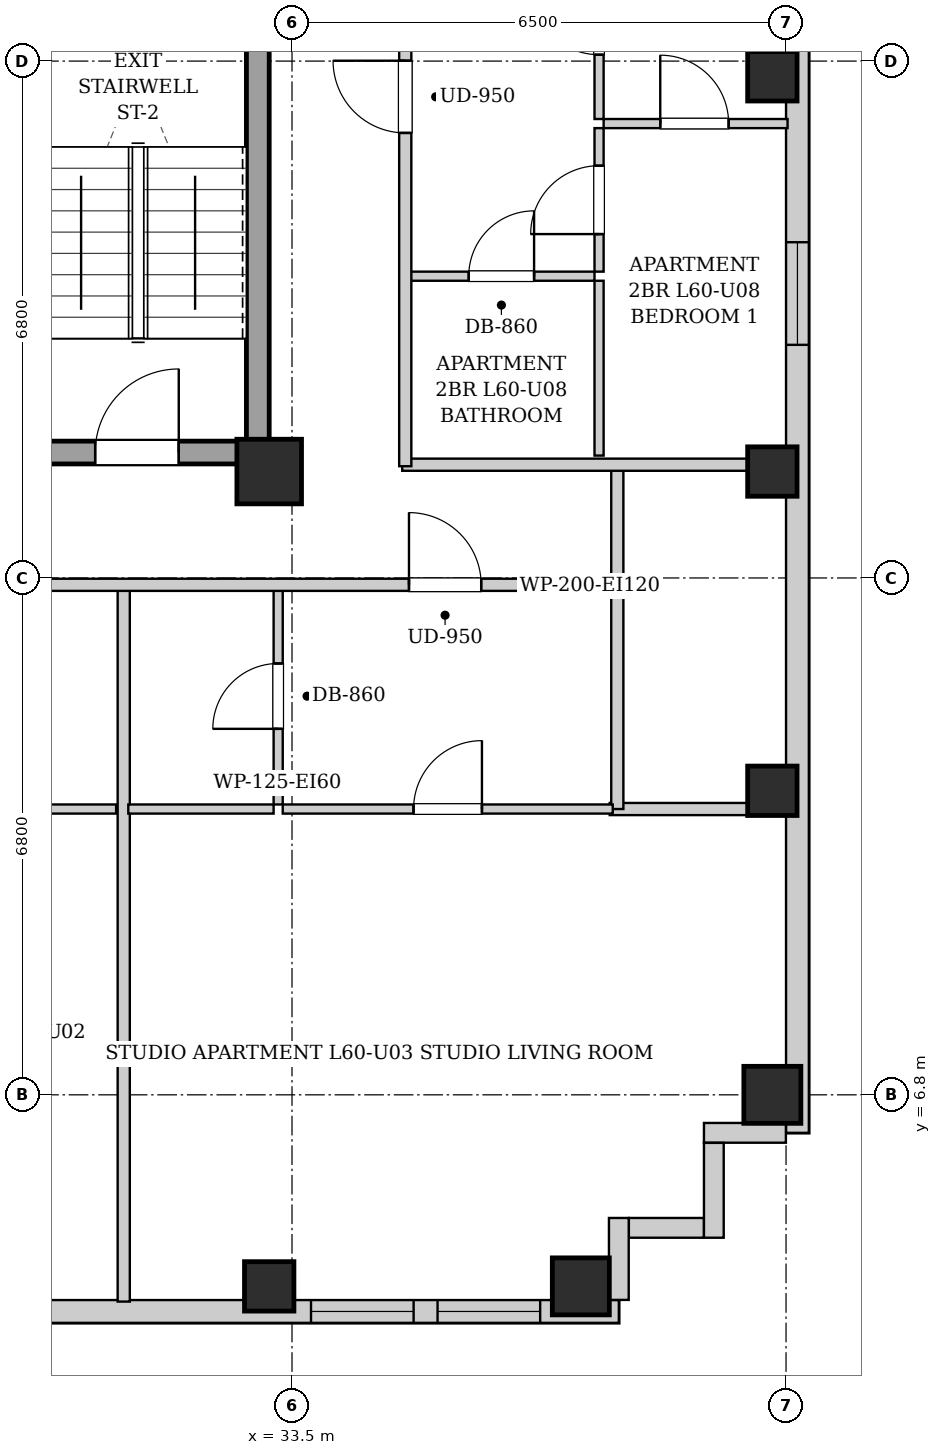
"""IFC4 building model, lengths in metres.
Left out: names, types, materials, properties, quantities, classifications, styles, units other than length and angle.
Written with IfcOpenShell. Run it as: python <this file> out.ifc"""

import sys

from ifc_helpers import new_model, si_unit, direction, frame, frame_2d, origin, origin_2d, place, context, subcontext, project, spatial, rectangle, extrude, element, fill, save


model = new_model("IFC4")
c1 = context("Model", 3, precision=1e-05, world=origin(), true_north=direction((0.0, 1.0)))
c2 = subcontext(c1, "Body", "Model", "MODEL_VIEW")
j1 = project(units=[si_unit("LENGTHUNIT", "METRE"), si_unit("PLANEANGLEUNIT", "RADIAN")], contexts=[c1])
p1 = place(None, origin())
s1 = spatial("IfcSite", under=j1, at=p1, CompositionType="ELEMENT")
p2 = place(p1, origin())
s2 = spatial("IfcBuilding", under=s1, at=p2, CompositionType="ELEMENT")
p3 = place(p2, frame((0.0, 0.0, 207.4)))
s3 = spatial("IfcBuildingStorey", under=s2, at=p3, CompositionType="ELEMENT", Elevation=207.4)
p4 = place(p3, frame((33.2, 4.28, 0.0), z_axis=(0.0, 0.0, 1.0), x_axis=(1.0, 0.0, 0.0)))
e1 = element("IfcColumn", 1, at=p4, inside=s3, PredefinedType="COLUMN", context=c2, shape_type="SweptSolid", body=[
    extrude(rectangle(XDim=0.65, YDim=0.65, at=origin_2d()), origin(), (0.0, 0.0, 1.0), 3.3),
])
for number, where, z_axis, x_axis in (
    (2, (37.3, 4.28, 0.0), (0.0, 0.0, 1.0), (1.0, 0.0, 0.0)),
    (3, (39.82, 6.8, 0.0), (0.0, 0.0, 1.0), (1.0, 0.0, 0.0)),
):
    element("IfcColumn", number, at=place(p3, frame(where, z_axis=z_axis, x_axis=x_axis)), inside=s3, PredefinedType="COLUMN", context=c2, shape_type="SweptSolid", body=[
        extrude(rectangle(XDim=0.75, YDim=0.75, at=origin_2d()), origin(), (0.0, 0.0, 1.0), 3.3),
    ])
for number, where, z_axis, x_axis in (
    (4, (39.82, 10.8, 0.0), (0.0, 0.0, 1.0), (1.0, 0.0, 0.0)),
    (5, (39.82, 15.0, 0.0), (0.0, 0.0, 1.0), (1.0, 0.0, 0.0)),
    (6, (39.82, 20.2, 0.0), (0.0, 0.0, 1.0), (1.0, 0.0, 0.0)),
):
    element("IfcColumn", number, at=place(p3, frame(where, z_axis=z_axis, x_axis=x_axis)), inside=s3, PredefinedType="COLUMN", context=c2, shape_type="SweptSolid", body=[
        extrude(rectangle(XDim=0.65, YDim=0.65, at=origin_2d()), origin(), (0.0, 0.0, 1.0), 3.3),
    ])
p5 = place(p3, frame((33.2, 15.0, 0.0), z_axis=(0.0, 0.0, 1.0), x_axis=(1.0, 0.0, 0.0)))
e7 = element("IfcColumn", 7, at=p5, inside=s3, PredefinedType="COLUMN", context=c2, shape_type="SweptSolid", body=[
    extrude(rectangle(XDim=0.85, YDim=0.85, at=origin_2d()), origin(), (0.0, 0.0, 1.0), 3.3),
])
p6 = place(p3, frame((40.15, 37.7, 0.0), z_axis=(0.0, 0.0, 1.0), x_axis=(0.0, -1.0, 0.0)))
e8 = element("IfcWall", 8, at=p6, inside=s3, PredefinedType="SOLIDWALL", context=c2, shape_type="SweptSolid", body=[
    extrude(rectangle(XDim=31.4, YDim=0.3, at=frame_2d((15.7, 0.0))), origin(), (0.0, 0.0, 1.0), 3.04),
])
p7 = place(p6, frame((1.504, 0.0, 0.55)))
e9 = element("IfcOpeningElement", 9, at=p7, cuts=e8, PredefinedType="OPENING", context=c2, shape_type="SweptSolid", body=[
    extrude(rectangle(XDim=1.35, YDim=1.2, at=frame_2d((0.675, 0.6))), frame((0.0, 0.16, 0.0), z_axis=(0.0, -1.0, 0.0), x_axis=(1.0, 0.0, 0.0)), (0.0, 0.0, 1.0), 0.32),
])
p8 = place(p6, frame((19.683, 0.0, 0.55)))
e10 = element("IfcOpeningElement", 10, at=p8, cuts=e8, PredefinedType="OPENING", context=c2, shape_type="SweptSolid", body=[
    extrude(rectangle(XDim=1.35, YDim=1.2, at=frame_2d((0.675, 0.6))), frame((0.0, 0.16, 0.0), z_axis=(0.0, -1.0, 0.0), x_axis=(1.0, 0.0, 0.0)), (0.0, 0.0, 1.0), 0.32),
])
p9 = place(p6, frame((10.367, 0.0, 0.55)))
e11 = element("IfcOpeningElement", 11, at=p9, cuts=e8, PredefinedType="OPENING", context=c2, shape_type="SweptSolid", body=[
    extrude(rectangle(XDim=1.35, YDim=1.2, at=frame_2d((0.675, 0.6))), frame((0.0, 0.16, 0.0), z_axis=(0.0, -1.0, 0.0), x_axis=(1.0, 0.0, 0.0)), (0.0, 0.0, 1.0), 0.32),
])
p10 = place(p3, frame((37.8, 3.95, 0.0), z_axis=(0.0, 0.0, 1.0), x_axis=(-1.0, 0.0, 0.0)))
e12 = element("IfcWall", 12, at=p10, inside=s3, PredefinedType="SOLIDWALL", context=c2, shape_type="SweptSolid", body=[
    extrude(rectangle(XDim=18.15, YDim=0.3, at=frame_2d((9.075, 0.0))), origin(), (0.0, 0.0, 1.0), 3.04),
])
p11 = place(p10, frame((15.6, 0.0, 0.55)))
e13 = element("IfcOpeningElement", 13, at=p11, cuts=e12, PredefinedType="OPENING", context=c2, shape_type="SweptSolid", body=[
    extrude(rectangle(XDim=1.35, YDim=1.2, at=frame_2d((0.675, 0.6))), frame((0.0, 0.16, 0.0), z_axis=(0.0, -1.0, 0.0), x_axis=(1.0, 0.0, 0.0)), (0.0, 0.0, 1.0), 0.32),
])
p12 = place(p10, frame((8.1, 0.0, 0.55)))
e14 = element("IfcOpeningElement", 14, at=p12, cuts=e12, PredefinedType="OPENING", context=c2, shape_type="SweptSolid", body=[
    extrude(rectangle(XDim=1.35, YDim=1.2, at=frame_2d((0.675, 0.6))), frame((0.0, 0.16, 0.0), z_axis=(0.0, -1.0, 0.0), x_axis=(1.0, 0.0, 0.0)), (0.0, 0.0, 1.0), 0.32),
])
p13 = place(p10, frame((2.7, 0.0, 0.55)))
e15 = element("IfcOpeningElement", 15, at=p13, cuts=e12, PredefinedType="OPENING", context=c2, shape_type="SweptSolid", body=[
    extrude(rectangle(XDim=1.35, YDim=1.2, at=frame_2d((0.675, 0.6))), frame((0.0, 0.16, 0.0), z_axis=(0.0, -1.0, 0.0), x_axis=(1.0, 0.0, 0.0)), (0.0, 0.0, 1.0), 0.32),
])
p14 = place(p10, frame((1.035, 0.0, 0.55)))
e16 = element("IfcOpeningElement", 16, at=p14, cuts=e12, PredefinedType="OPENING", context=c2, shape_type="SweptSolid", body=[
    extrude(rectangle(XDim=1.35, YDim=1.2, at=frame_2d((0.675, 0.6))), frame((0.0, 0.16, 0.0), z_axis=(0.0, -1.0, 0.0), x_axis=(1.0, 0.0, 0.0)), (0.0, 0.0, 1.0), 0.32),
])
p15 = place(p3, frame((39.998, 6.3, 0.0), z_axis=(0.0, 0.0, 1.0), x_axis=(-1.0, 0.0, 0.0)))
e17 = element("IfcWall", 17, at=p15, inside=s3, PredefinedType="SOLIDWALL", context=c2, shape_type="SweptSolid", body=[
    extrude(rectangle(XDim=1.078, YDim=0.26, at=frame_2d((0.539, 0.0))), origin(), (0.0, 0.0, 1.0), 3.04),
])
p16 = place(p3, frame((39.05, 6.168, 0.0), z_axis=(0.0, 0.0, 1.0), x_axis=(0.0, -1.0, 0.0)))
e18 = element("IfcWall", 18, at=p16, inside=s3, PredefinedType="SOLIDWALL", context=c2, shape_type="SweptSolid", body=[
    extrude(rectangle(XDim=1.248, YDim=0.26, at=frame_2d((0.624, 0.0))), origin(), (0.0, 0.0, 1.0), 3.04),
])
p17 = place(p3, frame((38.918, 5.05, 0.0), z_axis=(0.0, 0.0, 1.0), x_axis=(-1.0, 0.0, 0.0)))
e19 = element("IfcWall", 19, at=p17, inside=s3, PredefinedType="SOLIDWALL", context=c2, shape_type="SweptSolid", body=[
    extrude(rectangle(XDim=0.986, YDim=0.26, at=frame_2d((0.493, 0.0))), origin(), (0.0, 0.0, 1.0), 3.04),
])
p18 = place(p3, frame((37.8, 5.18, 0.0), z_axis=(0.0, 0.0, 1.0), x_axis=(0.0, -1.0, 0.0)))
e20 = element("IfcWall", 20, at=p18, inside=s3, PredefinedType="SOLIDWALL", context=c2, shape_type="SweptSolid", body=[
    extrude(rectangle(XDim=1.078, YDim=0.26, at=frame_2d((0.539, 0.0))), origin(), (0.0, 0.0, 1.0), 3.04),
])
p19 = place(p3, frame((33.05, 15.1, 0.0), z_axis=(0.0, 0.0, 1.0), x_axis=(0.0, 1.0, 0.0)))
e21 = element("IfcWall", 21, at=p19, inside=s3, PredefinedType="SHEAR", context=c2, shape_type="SweptSolid", body=[
    extrude(rectangle(XDim=9.0, YDim=0.3, at=frame_2d((4.5, 0.0))), origin(), (0.0, 0.0, 1.0), 3.04),
])
p20 = place(p3, frame((30.05, 15.25, 0.0), z_axis=(0.0, 0.0, 1.0), x_axis=(1.0, 0.0, 0.0)))
e22 = element("IfcWall", 22, at=p20, inside=s3, PredefinedType="SHEAR", context=c2, shape_type="SweptSolid", body=[
    extrude(rectangle(XDim=2.85, YDim=0.3, at=frame_2d((1.425, 0.0))), origin(), (0.0, 0.0, 1.0), 3.04),
])
p21 = place(p20, frame((0.86, 0.0, 0.0)))
e23 = element("IfcOpeningElement", 23, at=p21, cuts=e22, PredefinedType="OPENING", context=c2, shape_type="SweptSolid", body=[
    extrude(rectangle(XDim=1.1, YDim=2.05, at=frame_2d((0.55, 1.025))), frame((0.0, 0.16, 0.0), z_axis=(0.0, -1.0, 0.0), x_axis=(1.0, 0.0, 0.0)), (0.0, 0.0, 1.0), 0.32),
])
p22 = place(p3, frame((37.78, 13.51, 0.0), z_axis=(0.0, 0.0, 1.0), x_axis=(0.0, 1.0, 0.0)))
e24 = element("IfcWall", 24, at=p22, inside=s3, PredefinedType="PARTITIONING", context=c2, shape_type="SweptSolid", body=[
    extrude(rectangle(XDim=1.58, YDim=0.16, at=frame_2d((0.79, 0.0))), origin(), (0.0, 0.0, 1.0), 3.04),
])
p23 = place(p3, frame((34.95, 15.09, 0.0), z_axis=(0.0, 0.0, 1.0), x_axis=(1.0, 0.0, 0.0)))
e25 = element("IfcWall", 25, at=p23, inside=s3, PredefinedType="PARTITIONING", context=c2, shape_type="SweptSolid", body=[
    extrude(rectangle(XDim=5.07, YDim=0.16, at=frame_2d((2.535, 0.0))), origin(), (0.0, 0.0, 1.0), 2.556),
])
p24 = place(p3, frame((27.156, 10.56, 0.0), z_axis=(0.0, 0.0, 1.0), x_axis=(1.0, 0.0, 0.0)))
e26 = element("IfcWall", 26, at=p24, inside=s3, PredefinedType="PARTITIONING", context=c2, shape_type="SweptSolid", body=[
    extrude(rectangle(XDim=4.03, YDim=0.12, at=frame_2d((2.015, 0.0))), origin(), (0.0, 0.0, 1.0), 3.04),
])
p25 = place(p24, frame((1.565, 0.0, 0.0)))
e27 = element("IfcOpeningElement", 27, at=p25, cuts=e26, PredefinedType="OPENING", context=c2, shape_type="SweptSolid", body=[
    extrude(rectangle(XDim=0.9, YDim=2.05, at=frame_2d((0.45, 1.025))), frame((0.0, 0.07, 0.0), z_axis=(0.0, -1.0, 0.0), x_axis=(1.0, 0.0, 0.0)), (0.0, 0.0, 1.0), 0.14),
])
p26 = place(p3, frame((37.68, 10.56, 0.0), z_axis=(0.0, 0.0, 1.0), x_axis=(1.0, 0.0, 0.0)))
e28 = element("IfcWall", 28, at=p26, inside=s3, PredefinedType="PARTITIONING", context=c2, shape_type="SweptSolid", body=[
    extrude(rectangle(XDim=2.34, YDim=0.16, at=frame_2d((1.17, 0.0))), origin(), (0.0, 0.0, 1.0), 3.04),
])
p27 = place(p3, frame((37.78, 10.56, 0.0), z_axis=(0.0, 0.0, 1.0), x_axis=(0.0, 1.0, 0.0)))
e29 = element("IfcWall", 29, at=p27, inside=s3, PredefinedType="PARTITIONING", context=c2, shape_type="SweptSolid", body=[
    extrude(rectangle(XDim=2.91, YDim=0.16, at=frame_2d((1.455, 0.0))), origin(), (0.0, 0.0, 1.0), 3.04),
])
p28 = place(p3, frame((31.286, 4.08, 0.0), z_axis=(0.0, 0.0, 1.0), x_axis=(0.0, 1.0, 0.0)))
e30 = element("IfcWall", 30, at=p28, inside=s3, PredefinedType="PARTITIONING", context=c2, shape_type="SweptSolid", body=[
    extrude(rectangle(XDim=9.39, YDim=0.16, at=frame_2d((4.695, 0.0))), origin(), (0.0, 0.0, 1.0), 3.04),
])
p29 = place(p3, frame((33.318, 10.62, 0.0), z_axis=(0.0, 0.0, 1.0), x_axis=(0.0, 1.0, 0.0)))
e31 = element("IfcWall", 31, at=p29, inside=s3, PredefinedType="PARTITIONING", context=c2, shape_type="SweptSolid", body=[
    extrude(rectangle(XDim=2.85, YDim=0.12, at=frame_2d((1.425, 0.0))), origin(), (0.0, 0.0, 1.0), 3.04),
])
p30 = place(p29, frame((0.995, 0.0, 0.0)))
e32 = element("IfcOpeningElement", 32, at=p30, cuts=e31, PredefinedType="OPENING", context=c2, shape_type="SweptSolid", body=[
    extrude(rectangle(XDim=0.86, YDim=2.05, at=frame_2d((0.43, 1.025))), frame((0.0, 0.07, 0.0), z_axis=(0.0, -1.0, 0.0), x_axis=(1.0, 0.0, 0.0)), (0.0, 0.0, 1.0), 0.14),
])
p31 = place(p3, frame((31.346, 10.56, 0.0), z_axis=(0.0, 0.0, 1.0), x_axis=(1.0, 0.0, 0.0)))
e33 = element("IfcWall", 33, at=p31, inside=s3, PredefinedType="PARTITIONING", context=c2, shape_type="SweptSolid", body=[
    extrude(rectangle(XDim=1.912, YDim=0.12, at=frame_2d((0.956, 0.0))), origin(), (0.0, 0.0, 1.0), 3.04),
])
p32 = place(p3, frame((33.378, 10.56, 0.0), z_axis=(0.0, 0.0, 1.0), x_axis=(1.0, 0.0, 0.0)))
e34 = element("IfcWall", 34, at=p32, inside=s3, PredefinedType="PARTITIONING", context=c2, shape_type="SweptSolid", body=[
    extrude(rectangle(XDim=4.342, YDim=0.12, at=frame_2d((2.171, 0.0))), origin(), (0.0, 0.0, 1.0), 3.04),
])
p33 = place(p32, frame((1.721, 0.0, 0.0)))
e35 = element("IfcOpeningElement", 35, at=p33, cuts=e34, PredefinedType="OPENING", context=c2, shape_type="SweptSolid", body=[
    extrude(rectangle(XDim=0.9, YDim=2.05, at=frame_2d((0.45, 1.025))), frame((0.0, 0.07, 0.0), z_axis=(0.0, -1.0, 0.0), x_axis=(1.0, 0.0, 0.0)), (0.0, 0.0, 1.0), 0.14),
])
p34 = place(p3, frame((35.03, 17.57, 0.0), z_axis=(0.0, 0.0, 1.0), x_axis=(1.0, 0.0, 0.0)))
e36 = element("IfcWall", 36, at=p34, inside=s3, PredefinedType="PARTITIONING", context=c2, shape_type="SweptSolid", body=[
    extrude(rectangle(XDim=2.45, YDim=0.12, at=frame_2d((1.225, 0.0))), origin(), (0.0, 0.0, 1.0), 3.04),
])
p35 = place(p34, frame((0.795, 0.0, 0.0)))
e37 = element("IfcOpeningElement", 37, at=p35, cuts=e36, PredefinedType="OPENING", context=c2, shape_type="SweptSolid", body=[
    extrude(rectangle(XDim=0.86, YDim=2.05, at=frame_2d((0.43, 1.025))), frame((0.0, 0.07, 0.0), z_axis=(0.0, -1.0, 0.0), x_axis=(1.0, 0.0, 0.0)), (0.0, 0.0, 1.0), 0.14),
])
p36 = place(p3, frame((37.54, 15.21, 0.0), z_axis=(0.0, 0.0, 1.0), x_axis=(0.0, 1.0, 0.0)))
e38 = element("IfcWall", 38, at=p36, inside=s3, PredefinedType="PARTITIONING", context=c2, shape_type="SweptSolid", body=[
    extrude(rectangle(XDim=2.3, YDim=0.12, at=frame_2d((1.15, 0.0))), origin(), (0.0, 0.0, 1.0), 3.04),
])
p37 = place(p3, frame((37.54, 17.63, 0.0), z_axis=(0.0, 0.0, 1.0), x_axis=(0.0, 1.0, 0.0)))
e39 = element("IfcWall", 39, at=p37, inside=s3, PredefinedType="PARTITIONING", context=c2, shape_type="SweptSolid", body=[
    extrude(rectangle(XDim=1.888, YDim=0.12, at=frame_2d((0.944, 0.0))), origin(), (0.0, 0.0, 1.0), 3.04),
])
p38 = place(p37, frame((0.494, 0.0, 0.0)))
e40 = element("IfcOpeningElement", 40, at=p38, cuts=e39, PredefinedType="OPENING", context=c2, shape_type="SweptSolid", body=[
    extrude(rectangle(XDim=0.9, YDim=2.05, at=frame_2d((0.45, 1.025))), frame((0.0, 0.07, 0.0), z_axis=(0.0, -1.0, 0.0), x_axis=(1.0, 0.0, 0.0)), (0.0, 0.0, 1.0), 0.14),
])
p39 = place(p3, frame((37.54, 19.638, 0.0), z_axis=(0.0, 0.0, 1.0), x_axis=(0.0, 1.0, 0.0)))
e41 = element("IfcWall", 41, at=p39, inside=s3, PredefinedType="PARTITIONING", context=c2, shape_type="SweptSolid", body=[
    extrude(rectangle(XDim=2.592, YDim=0.12, at=frame_2d((1.296, 0.0))), origin(), (0.0, 0.0, 1.0), 3.04),
])
p40 = place(p39, frame((0.846, 0.0, 0.0)))
e42 = element("IfcOpeningElement", 42, at=p40, cuts=e41, PredefinedType="OPENING", context=c2, shape_type="SweptSolid", body=[
    extrude(rectangle(XDim=0.9, YDim=2.05, at=frame_2d((0.45, 1.025))), frame((0.0, 0.07, 0.0), z_axis=(0.0, -1.0, 0.0), x_axis=(1.0, 0.0, 0.0)), (0.0, 0.0, 1.0), 0.14),
])
p41 = place(p3, frame((37.6, 19.578, 0.0), z_axis=(0.0, 0.0, 1.0), x_axis=(1.0, 0.0, 0.0)))
e43 = element("IfcWall", 43, at=p41, inside=s3, PredefinedType="PARTITIONING", context=c2, shape_type="SweptSolid", body=[
    extrude(rectangle(XDim=2.42, YDim=0.12, at=frame_2d((1.21, 0.0))), origin(), (0.0, 0.0, 1.0), 3.04),
])
p42 = place(p41, frame((0.745, 0.0, 0.0)))
e44 = element("IfcOpeningElement", 44, at=p42, cuts=e43, PredefinedType="OPENING", context=c2, shape_type="SweptSolid", body=[
    extrude(rectangle(XDim=0.9, YDim=2.05, at=frame_2d((0.45, 1.025))), frame((0.0, 0.07, 0.0), z_axis=(0.0, -1.0, 0.0), x_axis=(1.0, 0.0, 0.0)), (0.0, 0.0, 1.0), 0.14),
])
p43 = place(p3, frame((13.15, 13.51, 0.0), z_axis=(0.0, 0.0, 1.0), x_axis=(1.0, 0.0, 0.0)))
e45 = element("IfcWall", 45, at=p43, inside=s3, PredefinedType="PARTITIONING", context=c2, shape_type="SweptSolid", body=[
    extrude(rectangle(XDim=24.6, YDim=0.16, at=frame_2d((12.3, 0.0))), origin(), (0.0, 0.0, 1.0), 3.04),
])
p44 = place(p43, frame((1.323, 0.0, 0.0)))
e46 = element("IfcOpeningElement", 46, at=p44, cuts=e45, PredefinedType="OPENING", context=c2, shape_type="SweptSolid", body=[
    extrude(rectangle(XDim=0.95, YDim=2.1, at=frame_2d((0.475, 1.05))), frame((0.0, 0.09, 0.0), z_axis=(0.0, -1.0, 0.0), x_axis=(1.0, 0.0, 0.0)), (0.0, 0.0, 1.0), 0.18),
])
p45 = place(p43, frame((8.585, 0.0, 0.0)))
e47 = element("IfcOpeningElement", 47, at=p45, cuts=e45, PredefinedType="OPENING", context=c2, shape_type="SweptSolid", body=[
    extrude(rectangle(XDim=0.95, YDim=2.1, at=frame_2d((0.475, 1.05))), frame((0.0, 0.09, 0.0), z_axis=(0.0, -1.0, 0.0), x_axis=(1.0, 0.0, 0.0)), (0.0, 0.0, 1.0), 0.18),
])
p46 = place(p43, frame((21.889, 0.0, 0.0)))
e48 = element("IfcOpeningElement", 48, at=p46, cuts=e45, PredefinedType="OPENING", context=c2, shape_type="SweptSolid", body=[
    extrude(rectangle(XDim=0.95, YDim=2.1, at=frame_2d((0.475, 1.05))), frame((0.0, 0.09, 0.0), z_axis=(0.0, -1.0, 0.0), x_axis=(1.0, 0.0, 0.0)), (0.0, 0.0, 1.0), 0.18),
])
p47 = place(p3, frame((34.99, 15.07, 0.0), z_axis=(0.0, 0.0, 1.0), x_axis=(0.0, 1.0, 0.0)))
e49 = element("IfcWall", 49, at=p47, inside=s3, PredefinedType="PARTITIONING", context=c2, shape_type="SweptSolid", body=[
    extrude(rectangle(XDim=13.93, YDim=0.16, at=frame_2d((6.965, 0.0))), origin(), (0.0, 0.0, 1.0), 3.04),
])
p48 = place(p47, frame((4.385, 0.0, 0.0)))
e50 = element("IfcOpeningElement", 50, at=p48, cuts=e49, PredefinedType="OPENING", context=c2, shape_type="SweptSolid", body=[
    extrude(rectangle(XDim=0.95, YDim=2.1, at=frame_2d((0.475, 1.05))), frame((0.0, 0.09, 0.0), z_axis=(0.0, -1.0, 0.0), x_axis=(1.0, 0.0, 0.0)), (0.0, 0.0, 1.0), 0.18),
])
p49 = place(p21, origin())
e51 = element("IfcDoor", 51, at=p49, inside=s3, OperationType="SINGLE_SWING_RIGHT", PredefinedType="DOOR", context=c2, shape_type="SweptSolid", body=[
    extrude(rectangle(XDim=1.1, YDim=2.05, at=frame_2d((0.55, 1.025))), frame((0.0, 0.025, 0.0), z_axis=(0.0, -1.0, 0.0), x_axis=(1.0, 0.0, 0.0)), (0.0, 0.0, 1.0), 0.05),
])
fill(e23, e51)
p50 = place(p30, origin())
e52 = element("IfcDoor", 52, at=p50, inside=s3, OperationType="SINGLE_SWING_LEFT", PredefinedType="DOOR", context=c2, shape_type="SweptSolid", body=[
    extrude(rectangle(XDim=0.86, YDim=2.05, at=frame_2d((0.43, 1.025))), frame((0.0, 0.025, 0.0), z_axis=(0.0, -1.0, 0.0), x_axis=(1.0, 0.0, 0.0)), (0.0, 0.0, 1.0), 0.05),
])
fill(e32, e52)
p51 = place(p33, origin())
e53 = element("IfcDoor", 53, at=p51, inside=s3, OperationType="SINGLE_SWING_RIGHT", PredefinedType="DOOR", context=c2, shape_type="SweptSolid", body=[
    extrude(rectangle(XDim=0.9, YDim=2.05, at=frame_2d((0.45, 1.025))), frame((0.0, 0.025, 0.0), z_axis=(0.0, -1.0, 0.0), x_axis=(1.0, 0.0, 0.0)), (0.0, 0.0, 1.0), 0.05),
])
fill(e35, e53)
p52 = place(p35, origin())
e54 = element("IfcDoor", 54, at=p52, inside=s3, OperationType="SINGLE_SWING_RIGHT", PredefinedType="DOOR", context=c2, shape_type="SweptSolid", body=[
    extrude(rectangle(XDim=0.86, YDim=2.05, at=frame_2d((0.43, 1.025))), frame((0.0, 0.025, 0.0), z_axis=(0.0, -1.0, 0.0), x_axis=(1.0, 0.0, 0.0)), (0.0, 0.0, 1.0), 0.05),
])
fill(e37, e54)
p53 = place(p38, origin())
e55 = element("IfcDoor", 55, at=p53, inside=s3, OperationType="SINGLE_SWING_LEFT", PredefinedType="DOOR", context=c2, shape_type="SweptSolid", body=[
    extrude(rectangle(XDim=0.9, YDim=2.05, at=frame_2d((0.45, 1.025))), frame((0.0, 0.025, 0.0), z_axis=(0.0, -1.0, 0.0), x_axis=(1.0, 0.0, 0.0)), (0.0, 0.0, 1.0), 0.05),
])
fill(e40, e55)
p54 = place(p40, origin())
e56 = element("IfcDoor", 56, at=p54, inside=s3, OperationType="SINGLE_SWING_RIGHT", PredefinedType="DOOR", context=c2, shape_type="SweptSolid", body=[
    extrude(rectangle(XDim=0.9, YDim=2.05, at=frame_2d((0.45, 1.025))), frame((0.0, 0.025, 0.0), z_axis=(0.0, -1.0, 0.0), x_axis=(1.0, 0.0, 0.0)), (0.0, 0.0, 1.0), 0.05),
])
fill(e42, e56)
p55 = place(p42, origin())
e57 = element("IfcDoor", 57, at=p55, inside=s3, OperationType="SINGLE_SWING_LEFT", PredefinedType="DOOR", context=c2, shape_type="SweptSolid", body=[
    extrude(rectangle(XDim=0.9, YDim=2.05, at=frame_2d((0.45, 1.025))), frame((0.0, 0.025, 0.0), z_axis=(0.0, -1.0, 0.0), x_axis=(1.0, 0.0, 0.0)), (0.0, 0.0, 1.0), 0.05),
])
fill(e44, e57)
p56 = place(p46, origin())
e58 = element("IfcDoor", 58, at=p56, inside=s3, OperationType="SINGLE_SWING_LEFT", PredefinedType="DOOR", context=c2, shape_type="SweptSolid", body=[
    extrude(rectangle(XDim=0.95, YDim=2.1, at=frame_2d((0.475, 1.05))), frame((0.0, 0.025, 0.0), z_axis=(0.0, -1.0, 0.0), x_axis=(1.0, 0.0, 0.0)), (0.0, 0.0, 1.0), 0.05),
])
fill(e48, e58)
p57 = place(p48, origin())
e59 = element("IfcDoor", 59, at=p57, inside=s3, OperationType="SINGLE_SWING_RIGHT", PredefinedType="DOOR", context=c2, shape_type="SweptSolid", body=[
    extrude(rectangle(XDim=0.95, YDim=2.1, at=frame_2d((0.475, 1.05))), frame((0.0, 0.025, 0.0), z_axis=(0.0, -1.0, 0.0), x_axis=(1.0, 0.0, 0.0)), (0.0, 0.0, 1.0), 0.05),
])
fill(e50, e59)
p58 = place(p13, origin())
e60 = element("IfcWindow", 60, at=p58, inside=s3, PartitioningType="SINGLE_PANEL", PredefinedType="WINDOW", context=c2, shape_type="SweptSolid", body=[
    extrude(rectangle(XDim=1.35, YDim=1.2, at=frame_2d((0.675, 0.6))), frame((0.0, 0.03, 0.0), z_axis=(0.0, -1.0, 0.0), x_axis=(1.0, 0.0, 0.0)), (0.0, 0.0, 1.0), 0.06),
])
fill(e15, e60)
p59 = place(p14, origin())
e61 = element("IfcWindow", 61, at=p59, inside=s3, PartitioningType="SINGLE_PANEL", PredefinedType="WINDOW", context=c2, shape_type="SweptSolid", body=[
    extrude(rectangle(XDim=1.35, YDim=1.2, at=frame_2d((0.675, 0.6))), frame((0.0, 0.03, 0.0), z_axis=(0.0, -1.0, 0.0), x_axis=(1.0, 0.0, 0.0)), (0.0, 0.0, 1.0), 0.06),
])
fill(e16, e61)
p60 = place(p8, origin())
e62 = element("IfcWindow", 62, at=p60, inside=s3, PartitioningType="SINGLE_PANEL", PredefinedType="WINDOW", context=c2, shape_type="SweptSolid", body=[
    extrude(rectangle(XDim=1.35, YDim=1.2, at=frame_2d((0.675, 0.6))), frame((0.0, 0.03, 0.0), z_axis=(0.0, -1.0, 0.0), x_axis=(1.0, 0.0, 0.0)), (0.0, 0.0, 1.0), 0.06),
])
fill(e10, e62)
save(model, sys.argv[1])
